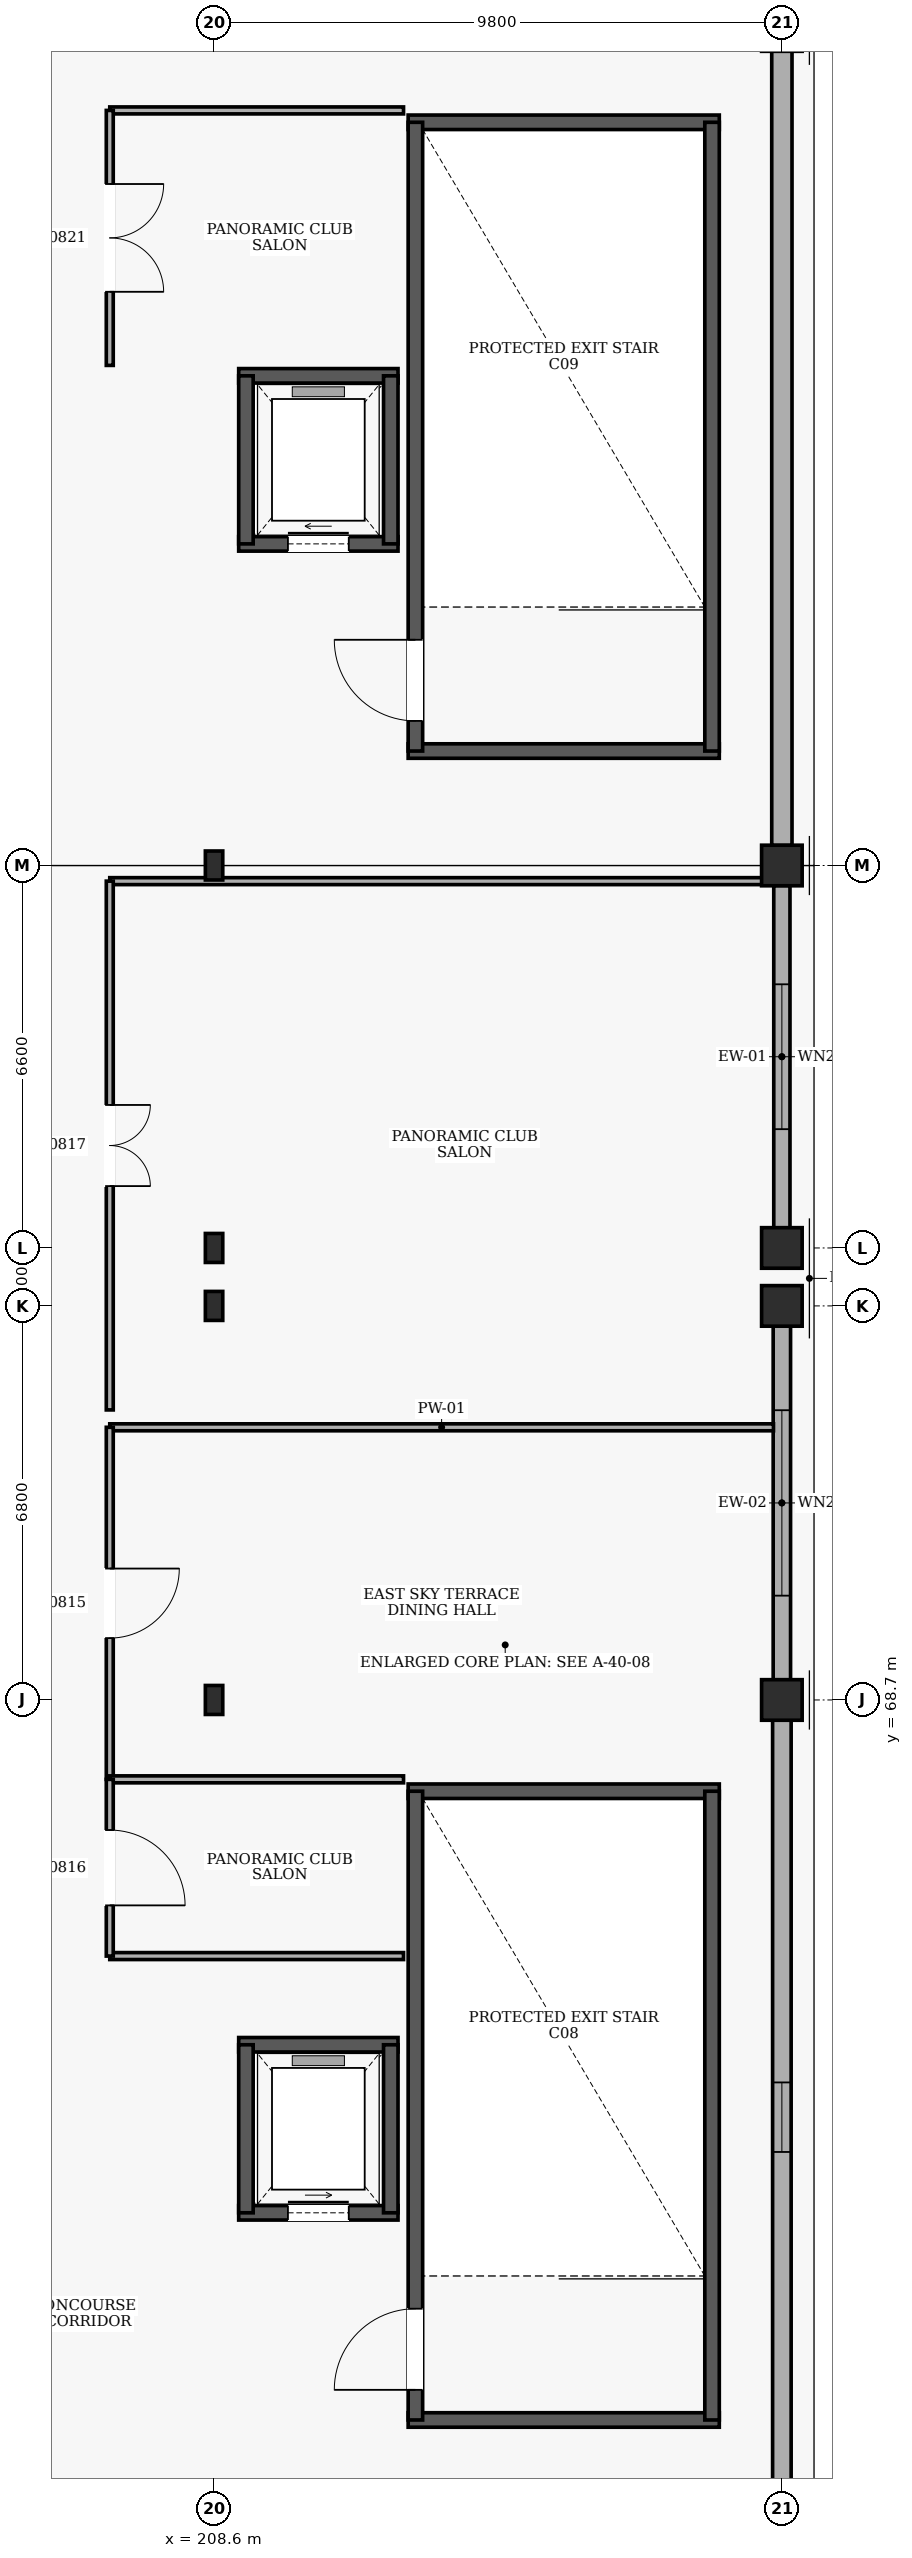
"""IFC4 building model, lengths in metres.
Left out: names, types, materials, properties, quantities, classifications, styles, units other than length and angle.
Written with IfcOpenShell. Run it as: python <this file> out.ifc"""

import sys

from ifc_helpers import new_model, si_unit, direction, frame, frame_2d, origin, origin_2d, place, context, subcontext, project, spatial, rectangle, i_section, extrude, element, fill, save


model = new_model("IFC4")
c1 = context("Model", 3, precision=1e-05, world=origin(), true_north=direction((0.0, 1.0)))
c2 = subcontext(c1, "Body", "Model", "MODEL_VIEW")
j1 = project(units=[si_unit("LENGTHUNIT", "METRE"), si_unit("PLANEANGLEUNIT", "RADIAN")], contexts=[c1])
p1 = place(None, origin())
s1 = spatial("IfcSite", under=j1, at=p1, CompositionType="ELEMENT")
p2 = place(p1, origin())
s2 = spatial("IfcBuilding", under=s1, at=p2, CompositionType="ELEMENT")
p3 = place(p2, frame((0.0, 0.0, 24.6)))
s3 = spatial("IfcBuildingStorey", under=s2, at=p3, CompositionType="ELEMENT", Elevation=24.6)
for number, where, z_axis, x_axis in (
    (1, (208.6, 68.7, 0.0), (0.0, 0.0, 1.0), (1.0, 0.0, 0.0)),
    (2, (208.6, 75.5, 0.0), (0.0, 0.0, 1.0), (1.0, 0.0, 0.0)),
    (3, (208.6, 76.5, 0.0), (0.0, 0.0, 1.0), (1.0, 0.0, 0.0)),
    (4, (208.6, 83.1, 0.0), (0.0, 0.0, 1.0), (1.0, 0.0, 0.0)),
):
    element("IfcColumn", number, at=place(p3, frame(where, z_axis=z_axis, x_axis=x_axis)), inside=s3, PredefinedType="COLUMN", context=c2, shape_type="SweptSolid", body=[
        extrude(i_section(OverallWidth=0.3, OverallDepth=0.5, WebThickness=0.014, FlangeThickness=0.028, at=origin_2d()), origin(), (0.0, 0.0, 1.0), 4.8),
    ])
for number, where, z_axis, x_axis in (
    (5, (218.4, 68.7, 0.0), (0.0, 0.0, 1.0), (1.0, 0.0, 0.0)),
    (6, (218.4, 75.5, 0.0), (0.0, 0.0, 1.0), (1.0, 0.0, 0.0)),
    (7, (218.4, 76.5, 0.0), (0.0, 0.0, 1.0), (1.0, 0.0, 0.0)),
    (8, (218.4, 83.1, 0.0), (0.0, 0.0, 1.0), (1.0, 0.0, 0.0)),
):
    element("IfcColumn", number, at=place(p3, frame(where, z_axis=z_axis, x_axis=x_axis)), inside=s3, PredefinedType="COLUMN", context=c2, shape_type="SweptSolid", body=[
        extrude(rectangle(XDim=0.7, YDim=0.7, at=origin_2d()), origin(), (0.0, 0.0, 1.0), 4.8),
    ])
p4 = place(p3, frame((218.4, 97.155, 0.0), z_axis=(0.0, 0.0, 1.0), x_axis=(0.0, -1.0, 0.0)))
e9 = element("IfcWall", 9, at=p4, inside=s3, PredefinedType="SOLIDWALL", context=c2, shape_type="SweptSolid", body=[
    extrude(rectangle(XDim=13.71, YDim=0.35, at=frame_2d((6.855, 0.0))), origin(), (0.0, 0.0, 1.0), 3.58),
])
p5 = place(p3, frame((218.4, 82.755, 0.0), z_axis=(0.0, 0.0, 1.0), x_axis=(0.0, -1.0, 0.0)))
e10 = element("IfcWall", 10, at=p5, inside=s3, PredefinedType="SOLIDWALL", context=c2, shape_type="SweptSolid", body=[
    extrude(rectangle(XDim=5.91, YDim=0.28, at=frame_2d((2.955, 0.0))), origin(), (0.0, 0.0, 1.0), 3.98),
])
p6 = place(p5, frame((1.705, 0.0, 0.9)))
e11 = element("IfcOpeningElement", 11, at=p6, cuts=e10, PredefinedType="OPENING", context=c2, shape_type="SweptSolid", body=[
    extrude(rectangle(XDim=2.5, YDim=2.4, at=frame_2d((1.25, 1.2))), frame((0.0, 0.15, 0.0), z_axis=(0.0, -1.0, 0.0), x_axis=(1.0, 0.0, 0.0)), (0.0, 0.0, 1.0), 0.3),
])
p7 = place(p3, frame((218.4, 75.155, 0.0), z_axis=(0.0, 0.0, 1.0), x_axis=(0.0, -1.0, 0.0)))
e12 = element("IfcWall", 12, at=p7, inside=s3, PredefinedType="SOLIDWALL", context=c2, shape_type="SweptSolid", body=[
    extrude(rectangle(XDim=6.11, YDim=0.3, at=frame_2d((3.055, 0.0))), origin(), (0.0, 0.0, 1.0), 3.88),
])
p8 = place(p7, frame((1.455, 0.0, 0.9)))
e13 = element("IfcOpeningElement", 13, at=p8, cuts=e12, PredefinedType="OPENING", context=c2, shape_type="SweptSolid", body=[
    extrude(rectangle(XDim=3.2, YDim=2.4, at=frame_2d((1.6, 1.2))), frame((0.0, 0.16, 0.0), z_axis=(0.0, -1.0, 0.0), x_axis=(1.0, 0.0, 0.0)), (0.0, 0.0, 1.0), 0.32),
])
p9 = place(p3, frame((218.4, 68.355, 0.0), z_axis=(0.0, 0.0, 1.0), x_axis=(0.0, -1.0, 0.0)))
e14 = element("IfcWall", 14, at=p9, inside=s3, PredefinedType="SOLIDWALL", context=c2, shape_type="SweptSolid", body=[
    extrude(rectangle(XDim=13.71, YDim=0.32, at=frame_2d((6.855, 0.0))), origin(), (0.0, 0.0, 1.0), 3.58),
])
p10 = place(p9, frame((6.255, 0.0, 0.9)))
e15 = element("IfcOpeningElement", 15, at=p10, cuts=e14, PredefinedType="OPENING", context=c2, shape_type="SweptSolid", body=[
    extrude(rectangle(XDim=1.2, YDim=1.5, at=frame_2d((0.6, 0.75))), frame((0.0, 0.17, 0.0), z_axis=(0.0, -1.0, 0.0), x_axis=(1.0, 0.0, 0.0)), (0.0, 0.0, 1.0), 0.34),
])
for number, where, z_axis, x_axis in (
    (16, (211.95, 56.275, 0.0), (0.0, 0.0, 1.0), (1.0, 0.0, 0.0)),
    (17, (217.32, 67.125, 0.0), (0.0, 0.0, 1.0), (-1.0, 0.0, 0.0)),
):
    element("IfcWall", number, at=place(p3, frame(where, z_axis=z_axis, x_axis=x_axis)), inside=s3, PredefinedType="SHEAR", context=c2, shape_type="SweptSolid", body=[
        extrude(rectangle(XDim=5.37, YDim=0.25, at=frame_2d((2.685, 0.0))), origin(), (0.0, 0.0, 1.0), 4.5),
    ])
p11 = place(p3, frame((212.075, 56.275, 0.0), z_axis=(0.0, 0.0, 1.0), x_axis=(0.0, 1.0, 0.0)))
e18 = element("IfcWall", 18, at=p11, inside=s3, PredefinedType="SHEAR", context=c2, shape_type="SweptSolid", body=[
    extrude(rectangle(XDim=10.85, YDim=0.25, at=frame_2d((5.425, 0.0))), origin(), (0.0, 0.0, 1.0), 4.5),
])
p12 = place(p11, frame((0.52, 0.0, 0.0)))
e19 = element("IfcOpeningElement", 19, at=p12, cuts=e18, PredefinedType="OPENING", context=c2, shape_type="SweptSolid", body=[
    extrude(rectangle(XDim=1.4, YDim=2.15, at=frame_2d((0.7, 1.075))), frame((0.0, 0.135, 0.0), z_axis=(0.0, -1.0, 0.0), x_axis=(1.0, 0.0, 0.0)), (0.0, 0.0, 1.0), 0.27),
])
p13 = place(p3, frame((217.195, 56.275, 0.0), z_axis=(0.0, 0.0, 1.0), x_axis=(0.0, 1.0, 0.0)))
e20 = element("IfcWall", 20, at=p13, inside=s3, PredefinedType="SHEAR", context=c2, shape_type="SweptSolid", body=[
    extrude(rectangle(XDim=10.85, YDim=0.25, at=frame_2d((5.425, 0.0))), origin(), (0.0, 0.0, 1.0), 4.5),
])
for number, where, z_axis, x_axis in (
    (21, (211.95, 85.075, 0.0), (0.0, 0.0, 1.0), (1.0, 0.0, 0.0)),
    (22, (217.32, 95.925, 0.0), (0.0, 0.0, 1.0), (-1.0, 0.0, 0.0)),
):
    element("IfcWall", number, at=place(p3, frame(where, z_axis=z_axis, x_axis=x_axis)), inside=s3, PredefinedType="SHEAR", context=c2, shape_type="SweptSolid", body=[
        extrude(rectangle(XDim=5.37, YDim=0.25, at=frame_2d((2.685, 0.0))), origin(), (0.0, 0.0, 1.0), 4.5),
    ])
p14 = place(p3, frame((212.075, 85.075, 0.0), z_axis=(0.0, 0.0, 1.0), x_axis=(0.0, 1.0, 0.0)))
e23 = element("IfcWall", 23, at=p14, inside=s3, PredefinedType="SHEAR", context=c2, shape_type="SweptSolid", body=[
    extrude(rectangle(XDim=10.85, YDim=0.25, at=frame_2d((5.425, 0.0))), origin(), (0.0, 0.0, 1.0), 4.5),
])
p15 = place(p14, frame((0.52, 0.0, 0.0)))
e24 = element("IfcOpeningElement", 24, at=p15, cuts=e23, PredefinedType="OPENING", context=c2, shape_type="SweptSolid", body=[
    extrude(rectangle(XDim=1.4, YDim=2.15, at=frame_2d((0.7, 1.075))), frame((0.0, 0.135, 0.0), z_axis=(0.0, -1.0, 0.0), x_axis=(1.0, 0.0, 0.0)), (0.0, 0.0, 1.0), 0.27),
])
p16 = place(p3, frame((217.195, 85.075, 0.0), z_axis=(0.0, 0.0, 1.0), x_axis=(0.0, 1.0, 0.0)))
e25 = element("IfcWall", 25, at=p16, inside=s3, PredefinedType="SHEAR", context=c2, shape_type="SweptSolid", body=[
    extrude(rectangle(XDim=10.85, YDim=0.25, at=frame_2d((5.425, 0.0))), origin(), (0.0, 0.0, 1.0), 4.5),
])
p17 = place(p3, frame((209.025, 59.85, 0.0), z_axis=(0.0, 0.0, 1.0), x_axis=(1.0, 0.0, 0.0)))
e26 = element("IfcWall", 26, at=p17, inside=s3, PredefinedType="SHEAR", context=c2, shape_type="SweptSolid", body=[
    extrude(rectangle(XDim=2.75, YDim=0.25, at=frame_2d((1.375, 0.0))), origin(), (0.0, 0.0, 1.0), 4.5),
])
p18 = place(p17, frame((0.85, 0.0, 0.0)))
e27 = element("IfcOpeningElement", 27, at=p18, cuts=e26, PredefinedType="OPENING", context=c2, shape_type="SweptSolid", body=[
    extrude(rectangle(XDim=1.05, YDim=2.15, at=frame_2d((0.525, 1.075))), frame((0.0, 0.135, 0.0), z_axis=(0.0, -1.0, 0.0), x_axis=(1.0, 0.0, 0.0)), (0.0, 0.0, 1.0), 0.27),
])
p19 = place(p3, frame((211.775, 62.75, 0.0), z_axis=(0.0, 0.0, 1.0), x_axis=(-1.0, 0.0, 0.0)))
e28 = element("IfcWall", 28, at=p19, inside=s3, PredefinedType="SHEAR", context=c2, shape_type="SweptSolid", body=[
    extrude(rectangle(XDim=2.75, YDim=0.25, at=frame_2d((1.375, 0.0))), origin(), (0.0, 0.0, 1.0), 4.5),
])
for number, where, z_axis, x_axis in (
    (29, (209.15, 62.75, 0.0), (0.0, 0.0, 1.0), (0.0, -1.0, 0.0)),
    (30, (211.65, 59.85, 0.0), (0.0, 0.0, 1.0), (0.0, 1.0, 0.0)),
):
    element("IfcWall", number, at=place(p3, frame(where, z_axis=z_axis, x_axis=x_axis)), inside=s3, PredefinedType="SHEAR", context=c2, shape_type="SweptSolid", body=[
        extrude(rectangle(XDim=2.9, YDim=0.25, at=frame_2d((1.45, 0.0))), origin(), (0.0, 0.0, 1.0), 4.5),
    ])
p20 = place(p3, frame((209.025, 88.65, 0.0), z_axis=(0.0, 0.0, 1.0), x_axis=(1.0, 0.0, 0.0)))
e31 = element("IfcWall", 31, at=p20, inside=s3, PredefinedType="SHEAR", context=c2, shape_type="SweptSolid", body=[
    extrude(rectangle(XDim=2.75, YDim=0.25, at=frame_2d((1.375, 0.0))), origin(), (0.0, 0.0, 1.0), 4.5),
])
p21 = place(p20, frame((0.85, 0.0, 0.0)))
e32 = element("IfcOpeningElement", 32, at=p21, cuts=e31, PredefinedType="OPENING", context=c2, shape_type="SweptSolid", body=[
    extrude(rectangle(XDim=1.05, YDim=2.15, at=frame_2d((0.525, 1.075))), frame((0.0, 0.135, 0.0), z_axis=(0.0, -1.0, 0.0), x_axis=(1.0, 0.0, 0.0)), (0.0, 0.0, 1.0), 0.27),
])
p22 = place(p3, frame((211.775, 91.55, 0.0), z_axis=(0.0, 0.0, 1.0), x_axis=(-1.0, 0.0, 0.0)))
e33 = element("IfcWall", 33, at=p22, inside=s3, PredefinedType="SHEAR", context=c2, shape_type="SweptSolid", body=[
    extrude(rectangle(XDim=2.75, YDim=0.25, at=frame_2d((1.375, 0.0))), origin(), (0.0, 0.0, 1.0), 4.5),
])
for number, where, z_axis, x_axis in (
    (34, (209.15, 91.55, 0.0), (0.0, 0.0, 1.0), (0.0, -1.0, 0.0)),
    (35, (211.65, 88.65, 0.0), (0.0, 0.0, 1.0), (0.0, 1.0, 0.0)),
):
    element("IfcWall", number, at=place(p3, frame(where, z_axis=z_axis, x_axis=x_axis)), inside=s3, PredefinedType="SHEAR", context=c2, shape_type="SweptSolid", body=[
        extrude(rectangle(XDim=2.9, YDim=0.25, at=frame_2d((1.45, 0.0))), origin(), (0.0, 0.0, 1.0), 4.5),
    ])
p23 = place(p3, frame((218.255, 73.405, 0.0), z_axis=(0.0, 0.0, 1.0), x_axis=(-1.0, 0.0, 0.0)))
e36 = element("IfcWall", 36, at=p23, inside=s3, PredefinedType="PARTITIONING", context=c2, shape_type="SweptSolid", body=[
    extrude(rectangle(XDim=11.455, YDim=0.12, at=frame_2d((5.728, 0.0))), origin(), (0.0, 0.0, 1.0), 4.5),
])
p24 = place(p3, frame((206.8, 73.405, 0.0), z_axis=(0.0, 0.0, 1.0), x_axis=(0.0, -1.0, 0.0)))
e37 = element("IfcWall", 37, at=p24, inside=s3, PredefinedType="PARTITIONING", context=c2, shape_type="SweptSolid", body=[
    extrude(rectangle(XDim=6.075, YDim=0.12, at=frame_2d((3.038, 0.0))), origin(), (0.0, 0.0, 1.0), 4.5),
])
p25 = place(p24, frame((2.438, 0.0, 0.0)))
e38 = element("IfcOpeningElement", 38, at=p25, cuts=e37, PredefinedType="OPENING", context=c2, shape_type="SweptSolid", body=[
    extrude(rectangle(XDim=1.2, YDim=2.15, at=frame_2d((0.6, 1.075))), frame((0.0, 0.07, 0.0), z_axis=(0.0, -1.0, 0.0), x_axis=(1.0, 0.0, 0.0)), (0.0, 0.0, 1.0), 0.14),
])
for number, where, z_axis, x_axis in (
    (39, (206.8, 64.281, 0.0), (0.0, 0.0, 1.0), (1.0, 0.0, 0.0)),
    (40, (211.87, 67.33, 0.0), (0.0, 0.0, 1.0), (-1.0, 0.0, 0.0)),
):
    element("IfcWall", number, at=place(p3, frame(where, z_axis=z_axis, x_axis=x_axis)), inside=s3, PredefinedType="PARTITIONING", context=c2, shape_type="SweptSolid", body=[
        extrude(rectangle(XDim=5.07, YDim=0.12, at=frame_2d((2.535, 0.0))), origin(), (0.0, 0.0, 1.0), 4.5),
    ])
p26 = place(p3, frame((206.8, 67.33, 0.0), z_axis=(0.0, 0.0, 1.0), x_axis=(0.0, -1.0, 0.0)))
e41 = element("IfcWall", 41, at=p26, inside=s3, PredefinedType="PARTITIONING", context=c2, shape_type="SweptSolid", body=[
    extrude(rectangle(XDim=3.05, YDim=0.12, at=frame_2d((1.525, 0.0))), origin(), (0.0, 0.0, 1.0), 4.5),
])
p27 = place(p26, frame((0.875, 0.0, 0.0)))
e42 = element("IfcOpeningElement", 42, at=p27, cuts=e41, PredefinedType="OPENING", context=c2, shape_type="SweptSolid", body=[
    extrude(rectangle(XDim=1.3, YDim=2.2, at=frame_2d((0.65, 1.1))), frame((0.0, 0.07, 0.0), z_axis=(0.0, -1.0, 0.0), x_axis=(1.0, 0.0, 0.0)), (0.0, 0.0, 1.0), 0.14),
])
p28 = place(p3, frame((218.255, 82.83, 0.0), z_axis=(0.0, 0.0, 1.0), x_axis=(-1.0, 0.0, 0.0)))
e43 = element("IfcWall", 43, at=p28, inside=s3, PredefinedType="PARTITIONING", context=c2, shape_type="SweptSolid", body=[
    extrude(rectangle(XDim=11.455, YDim=0.12, at=frame_2d((5.728, 0.0))), origin(), (0.0, 0.0, 1.0), 3.78),
])
p29 = place(p3, frame((206.8, 82.83, 0.0), z_axis=(0.0, 0.0, 1.0), x_axis=(0.0, -1.0, 0.0)))
e44 = element("IfcWall", 44, at=p29, inside=s3, PredefinedType="PARTITIONING", context=c2, shape_type="SweptSolid", body=[
    extrude(rectangle(XDim=9.125, YDim=0.12, at=frame_2d((4.562, 0.0))), origin(), (0.0, 0.0, 1.0), 4.5),
])
p30 = place(p29, frame((3.862, 0.0, 0.0)))
e45 = element("IfcOpeningElement", 45, at=p30, cuts=e44, PredefinedType="OPENING", context=c2, shape_type="SweptSolid", body=[
    extrude(rectangle(XDim=1.4, YDim=2.2, at=frame_2d((0.7, 1.1))), frame((0.0, 0.07, 0.0), z_axis=(0.0, -1.0, 0.0), x_axis=(1.0, 0.0, 0.0)), (0.0, 0.0, 1.0), 0.14),
])
p31 = place(p3, frame((211.87, 96.13, 0.0), z_axis=(0.0, 0.0, 1.0), x_axis=(-1.0, 0.0, 0.0)))
e46 = element("IfcWall", 46, at=p31, inside=s3, PredefinedType="PARTITIONING", context=c2, shape_type="SweptSolid", body=[
    extrude(rectangle(XDim=5.07, YDim=0.12, at=frame_2d((2.535, 0.0))), origin(), (0.0, 0.0, 1.0), 4.5),
])
p32 = place(p3, frame((206.8, 96.13, 0.0), z_axis=(0.0, 0.0, 1.0), x_axis=(0.0, -1.0, 0.0)))
e47 = element("IfcWall", 47, at=p32, inside=s3, PredefinedType="PARTITIONING", context=c2, shape_type="SweptSolid", body=[
    extrude(rectangle(XDim=4.4, YDim=0.12, at=frame_2d((2.2, 0.0))), origin(), (0.0, 0.0, 1.0), 4.5),
])
p33 = place(p32, frame((1.27, 0.0, 0.0)))
e48 = element("IfcOpeningElement", 48, at=p33, cuts=e47, PredefinedType="OPENING", context=c2, shape_type="SweptSolid", body=[
    extrude(rectangle(XDim=1.86, YDim=2.3, at=frame_2d((0.93, 1.15))), frame((0.0, 0.07, 0.0), z_axis=(0.0, -1.0, 0.0), x_axis=(1.0, 0.0, 0.0)), (0.0, 0.0, 1.0), 0.14),
])
p34 = place(p6, origin())
e49 = element("IfcWindow", 49, at=p34, inside=s3, PartitioningType="SINGLE_PANEL", PredefinedType="WINDOW", context=c2, shape_type="SweptSolid", body=[
    extrude(rectangle(XDim=2.5, YDim=2.4, at=frame_2d((1.25, 1.2))), frame((0.0, 0.03, 0.0), z_axis=(0.0, -1.0, 0.0), x_axis=(1.0, 0.0, 0.0)), (0.0, 0.0, 1.0), 0.06),
])
fill(e11, e49)
p35 = place(p8, origin())
e50 = element("IfcWindow", 50, at=p35, inside=s3, PartitioningType="SINGLE_PANEL", PredefinedType="WINDOW", context=c2, shape_type="SweptSolid", body=[
    extrude(rectangle(XDim=3.2, YDim=2.4, at=frame_2d((1.6, 1.2))), frame((0.0, 0.03, 0.0), z_axis=(0.0, -1.0, 0.0), x_axis=(1.0, 0.0, 0.0)), (0.0, 0.0, 1.0), 0.06),
])
fill(e13, e50)
p36 = place(p10, origin())
e51 = element("IfcWindow", 51, at=p36, inside=s3, PartitioningType="SINGLE_PANEL", PredefinedType="WINDOW", context=c2, shape_type="SweptSolid", body=[
    extrude(rectangle(XDim=1.2, YDim=1.5, at=frame_2d((0.6, 0.75))), frame((0.0, 0.03, 0.0), z_axis=(0.0, -1.0, 0.0), x_axis=(1.0, 0.0, 0.0)), (0.0, 0.0, 1.0), 0.06),
])
fill(e15, e51)
p37 = place(p12, frame((1.4, 0.0, 0.0), z_axis=(0.0, 0.0, 1.0), x_axis=(-1.0, 0.0, 0.0)))
e52 = element("IfcDoor", 52, at=p37, inside=s3, OperationType="SINGLE_SWING_RIGHT", PredefinedType="DOOR", context=c2, shape_type="SweptSolid", body=[
    extrude(rectangle(XDim=1.4, YDim=2.15, at=frame_2d((0.7, 1.075))), frame((0.0, 0.025, 0.0), z_axis=(0.0, -1.0, 0.0), x_axis=(1.0, 0.0, 0.0)), (0.0, 0.0, 1.0), 0.05),
])
fill(e19, e52)
p38 = place(p15, frame((1.4, 0.0, 0.0), z_axis=(0.0, 0.0, 1.0), x_axis=(-1.0, 0.0, 0.0)))
e53 = element("IfcDoor", 53, at=p38, inside=s3, OperationType="SINGLE_SWING_LEFT", PredefinedType="DOOR", context=c2, shape_type="SweptSolid", body=[
    extrude(rectangle(XDim=1.4, YDim=2.15, at=frame_2d((0.7, 1.075))), frame((0.0, 0.025, 0.0), z_axis=(0.0, -1.0, 0.0), x_axis=(1.0, 0.0, 0.0)), (0.0, 0.0, 1.0), 0.05),
])
fill(e24, e53)
p39 = place(p18, origin())
e54 = element("IfcDoor", 54, at=p39, inside=s3, OperationType="SLIDING_TO_LEFT", PredefinedType="DOOR", context=c2, shape_type="SweptSolid", body=[
    extrude(rectangle(XDim=1.05, YDim=2.15, at=frame_2d((0.525, 1.075))), frame((0.0, 0.025, 0.0), z_axis=(0.0, -1.0, 0.0), x_axis=(1.0, 0.0, 0.0)), (0.0, 0.0, 1.0), 0.05),
])
fill(e27, e54)
p40 = place(p21, origin())
e55 = element("IfcDoor", 55, at=p40, inside=s3, OperationType="SLIDING_TO_RIGHT", PredefinedType="DOOR", context=c2, shape_type="SweptSolid", body=[
    extrude(rectangle(XDim=1.05, YDim=2.15, at=frame_2d((0.525, 1.075))), frame((0.0, 0.025, 0.0), z_axis=(0.0, -1.0, 0.0), x_axis=(1.0, 0.0, 0.0)), (0.0, 0.0, 1.0), 0.05),
])
fill(e32, e55)
p41 = place(p25, origin())
e56 = element("IfcDoor", 56, at=p41, inside=s3, OperationType="SINGLE_SWING_LEFT", PredefinedType="DOOR", context=c2, shape_type="SweptSolid", body=[
    extrude(rectangle(XDim=1.2, YDim=2.15, at=frame_2d((0.6, 1.075))), frame((0.0, 0.025, 0.0), z_axis=(0.0, -1.0, 0.0), x_axis=(1.0, 0.0, 0.0)), (0.0, 0.0, 1.0), 0.05),
])
fill(e38, e56)
p42 = place(p27, origin())
e57 = element("IfcDoor", 57, at=p42, inside=s3, OperationType="SINGLE_SWING_RIGHT", PredefinedType="DOOR", context=c2, shape_type="SweptSolid", body=[
    extrude(rectangle(XDim=1.3, YDim=2.2, at=frame_2d((0.65, 1.1))), frame((0.0, 0.025, 0.0), z_axis=(0.0, -1.0, 0.0), x_axis=(1.0, 0.0, 0.0)), (0.0, 0.0, 1.0), 0.05),
])
fill(e42, e57)
p43 = place(p30, origin())
e58 = element("IfcDoor", 58, at=p43, inside=s3, OperationType="DOUBLE_DOOR_SINGLE_SWING", PredefinedType="DOOR", context=c2, shape_type="SweptSolid", body=[
    extrude(rectangle(XDim=1.4, YDim=2.2, at=frame_2d((0.7, 1.1))), frame((0.0, 0.025, 0.0), z_axis=(0.0, -1.0, 0.0), x_axis=(1.0, 0.0, 0.0)), (0.0, 0.0, 1.0), 0.05),
])
fill(e45, e58)
p44 = place(p33, origin())
e59 = element("IfcDoor", 59, at=p44, inside=s3, OperationType="DOUBLE_DOOR_SINGLE_SWING", PredefinedType="DOOR", context=c2, shape_type="SweptSolid", body=[
    extrude(rectangle(XDim=1.86, YDim=2.3, at=frame_2d((0.93, 1.15))), frame((0.0, 0.025, 0.0), z_axis=(0.0, -1.0, 0.0), x_axis=(1.0, 0.0, 0.0)), (0.0, 0.0, 1.0), 0.05),
])
fill(e48, e59)
save(model, sys.argv[1])
